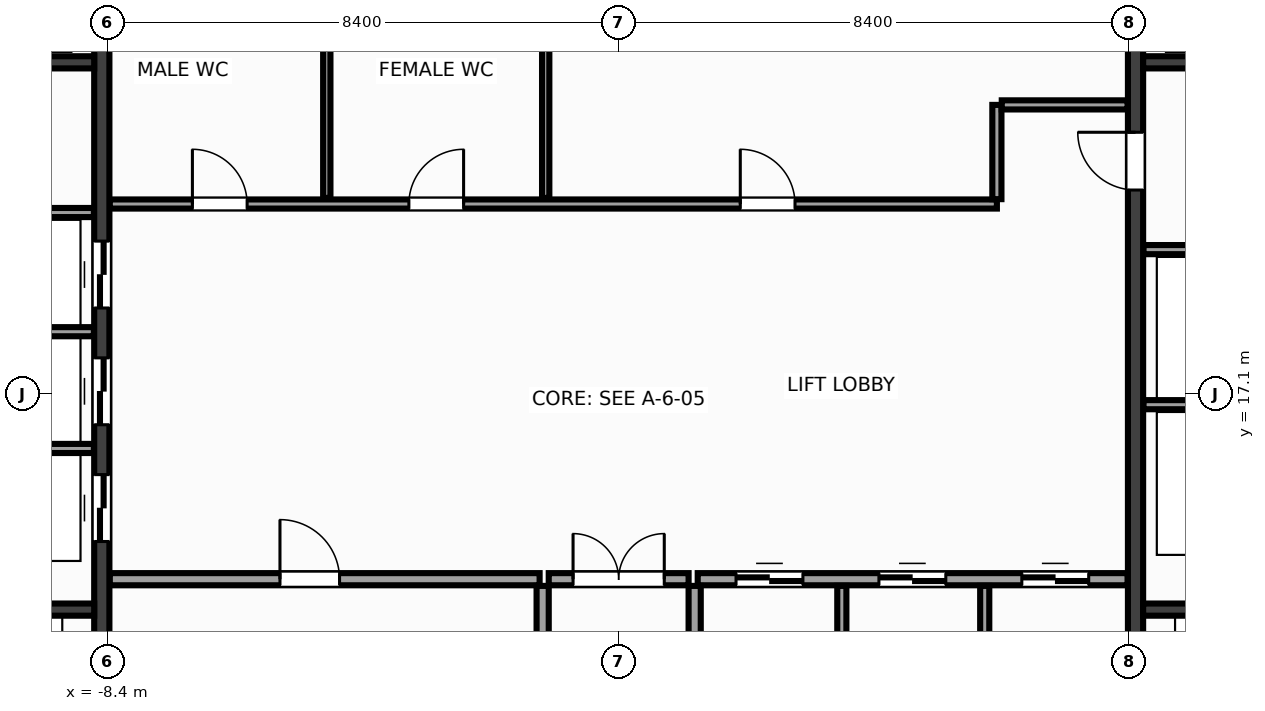
"""IFC4 building model, lengths in metres.
Left out: names, types, materials, properties, quantities, classifications, styles, units other than length and angle.
Written with IfcOpenShell. Run it as: python <this file> out.ifc"""

import sys

from ifc_helpers import new_model, si_unit, direction, frame, frame_2d, origin, place, context, subcontext, project, spatial, rectangle, extrude, source, transform, mapped, element, fill, save


model = new_model("IFC4")
c1 = context("Model", 3, precision=1e-05, world=origin(), true_north=direction((0.0, 1.0)))
c2 = subcontext(c1, "Body", "Model", "MODEL_VIEW")
j1 = project(units=[si_unit("LENGTHUNIT", "METRE"), si_unit("PLANEANGLEUNIT", "RADIAN")], contexts=[c1])
p1 = place(None, origin())
s1 = spatial("IfcSite", under=j1, at=p1, CompositionType="ELEMENT")
p2 = place(p1, origin())
s2 = spatial("IfcBuilding", under=s1, at=p2, CompositionType="ELEMENT")
p3 = place(p2, frame((0.0, 0.0, 149.6)))
s3 = spatial("IfcBuildingStorey", under=s2, at=p3, CompositionType="ELEMENT", Elevation=149.6)
m1 = source(origin(), c2, "Body", "SweptSolid", [
    extrude(rectangle(XDim=12.95, YDim=0.25, at=frame_2d((6.475, 0.0))), origin(), (0.0, 0.0, 1.0), 3.6),
])
p4 = place(p3, frame((-8.5, 10.525, 0.0), z_axis=(0.0, 0.0, 1.0), x_axis=(0.0, 1.0, 0.0)))
e1 = element("IfcWall", 1, at=p4, inside=s3, PredefinedType="SHEAR", context=c2, shape_type="MappedRepresentation", body=[
    mapped(m1, transform((0.0, 0.0, 0.0), x_axis=(1.0, 0.0, 0.0), y_axis=(0.0, 1.0, 0.0), z_axis=(0.0, 0.0, 1.0), scale=1.0)),
])
p5 = place(p4, frame((4.145, 0.0, 0.0)))
e2 = element("IfcOpeningElement", 2, at=p5, cuts=e1, PredefinedType="OPENING", context=c2, shape_type="SweptSolid", body=[
    extrude(rectangle(XDim=1.1, YDim=2.15, at=frame_2d((0.55, 1.075))), frame((0.0, 0.137, 0.0), z_axis=(0.0, -1.0, 0.0), x_axis=(1.0, 0.0, 0.0)), (0.0, 0.0, 1.0), 0.274),
])
p6 = place(p4, frame((6.065, 0.0, 0.0)))
e3 = element("IfcOpeningElement", 3, at=p6, cuts=e1, PredefinedType="OPENING", context=c2, shape_type="SweptSolid", body=[
    extrude(rectangle(XDim=1.1, YDim=2.15, at=frame_2d((0.55, 1.075))), frame((0.0, 0.137, 0.0), z_axis=(0.0, -1.0, 0.0), x_axis=(1.0, 0.0, 0.0)), (0.0, 0.0, 1.0), 0.274),
])
p7 = place(p4, frame((7.985, 0.0, 0.0)))
e4 = element("IfcOpeningElement", 4, at=p7, cuts=e1, PredefinedType="OPENING", context=c2, shape_type="SweptSolid", body=[
    extrude(rectangle(XDim=1.1, YDim=2.15, at=frame_2d((0.55, 1.075))), frame((0.0, 0.137, 0.0), z_axis=(0.0, -1.0, 0.0), x_axis=(1.0, 0.0, 0.0)), (0.0, 0.0, 1.0), 0.274),
])
p8 = place(p3, frame((8.5, 10.525, 0.0), z_axis=(0.0, 0.0, 1.0), x_axis=(0.0, 1.0, 0.0)))
e5 = element("IfcWall", 5, at=p8, inside=s3, PredefinedType="SHEAR", context=c2, shape_type="MappedRepresentation", body=[
    mapped(m1, transform((0.0, 0.0, 0.0), x_axis=(1.0, 0.0, 0.0), y_axis=(0.0, 1.0, 0.0), z_axis=(0.0, 0.0, 1.0), scale=1.0)),
])
p9 = place(p8, frame((9.925, 0.0, 0.0)))
e6 = element("IfcOpeningElement", 6, at=p9, cuts=e5, PredefinedType="OPENING", context=c2, shape_type="SweptSolid", body=[
    extrude(rectangle(XDim=0.95, YDim=2.15, at=frame_2d((0.475, 1.075))), frame((0.0, 0.137, 0.0), z_axis=(0.0, -1.0, 0.0), x_axis=(1.0, 0.0, 0.0)), (0.0, 0.0, 1.0), 0.274),
])
m2 = source(origin(), c2, "Body", "SweptSolid", [
    extrude(rectangle(XDim=2.825, YDim=0.2, at=frame_2d((1.413, 0.0))), origin(), (0.0, 0.0, 1.0), 3.6),
])
for number, where, z_axis, x_axis in (
    (7, (-11.45, 13.55, 0.0), (0.0, 0.0, 1.0), (1.0, 0.0, 0.0)),
    (8, (8.625, 13.55, 0.0), (0.0, 0.0, 1.0), (1.0, 0.0, 0.0)),
):
    element("IfcWall", number, at=place(p3, frame(where, z_axis=z_axis, x_axis=x_axis)), inside=s3, PredefinedType="SHEAR", context=c2, shape_type="MappedRepresentation", body=[
        mapped(m2, transform((0.0, 0.0, 0.0), x_axis=(1.0, 0.0, 0.0), y_axis=(0.0, 1.0, 0.0), z_axis=(0.0, 0.0, 1.0), scale=1.0)),
    ])
m3 = source(origin(), c2, "Body", "SweptSolid", [
    extrude(rectangle(XDim=3.02, YDim=0.2, at=frame_2d((1.51, 0.0))), origin(), (0.0, 0.0, 1.0), 3.6),
])
for number, where, z_axis, x_axis in (
    (9, (-11.645, 22.55, 0.0), (0.0, 0.0, 1.0), (1.0, 0.0, 0.0)),
    (10, (8.625, 22.55, 0.0), (0.0, 0.0, 1.0), (1.0, 0.0, 0.0)),
):
    element("IfcWall", number, at=place(p3, frame(where, z_axis=z_axis, x_axis=x_axis)), inside=s3, PredefinedType="SHEAR", context=c2, shape_type="MappedRepresentation", body=[
        mapped(m3, transform((0.0, 0.0, 0.0), x_axis=(1.0, 0.0, 0.0), y_axis=(0.0, 1.0, 0.0), z_axis=(0.0, 0.0, 1.0), scale=1.0)),
    ])
m4 = source(origin(), c2, "Body", "SweptSolid", [
    extrude(rectangle(XDim=3.01, YDim=0.15, at=frame_2d((1.505, 0.0))), origin(), (0.0, 0.0, 1.0), 3.38),
])
for number, where, z_axis, x_axis in (
    (11, (-11.64, 16.2, 0.0), (0.0, 0.0, 1.0), (1.0, 0.0, 0.0)),
    (12, (-11.64, 18.12, 0.0), (0.0, 0.0, 1.0), (1.0, 0.0, 0.0)),
    (13, (-11.64, 20.08, 0.0), (0.0, 0.0, 1.0), (1.0, 0.0, 0.0)),
    (14, (8.63, 16.92, 0.0), (0.0, 0.0, 1.0), (1.0, 0.0, 0.0)),
    (15, (8.63, 19.47, 0.0), (0.0, 0.0, 1.0), (1.0, 0.0, 0.0)),
):
    element("IfcWall", number, at=place(p3, frame(where, z_axis=z_axis, x_axis=x_axis)), inside=s3, PredefinedType="PARTITIONING", context=c2, shape_type="MappedRepresentation", body=[
        mapped(m4, transform((0.0, 0.0, 0.0), x_axis=(1.0, 0.0, 0.0), y_axis=(0.0, 1.0, 0.0), z_axis=(0.0, 0.0, 1.0), scale=1.0)),
    ])
m5 = source(origin(), c2, "Body", "SweptSolid", [
    extrude(rectangle(XDim=7.07, YDim=0.2, at=frame_2d((3.535, 0.0))), origin(), (0.0, 0.0, 1.0), 3.38),
])
p10 = place(p3, frame((-8.37, 14.05, 0.0), z_axis=(0.0, 0.0, 1.0), x_axis=(1.0, 0.0, 0.0)))
e16 = element("IfcWall", 16, at=p10, inside=s3, PredefinedType="PARTITIONING", context=c2, shape_type="MappedRepresentation", body=[
    mapped(m5, transform((0.0, 0.0, 0.0), x_axis=(1.0, 0.0, 0.0), y_axis=(0.0, 1.0, 0.0), z_axis=(0.0, 0.0, 1.0), scale=1.0)),
])
p11 = place(p10, frame((2.8, 0.0, 0.0)))
e17 = element("IfcOpeningElement", 17, at=p11, cuts=e16, PredefinedType="OPENING", context=c2, shape_type="SweptSolid", body=[
    extrude(rectangle(XDim=0.98, YDim=2.15, at=frame_2d((0.49, 1.075))), frame((0.0, 0.112, 0.0), z_axis=(0.0, -1.0, 0.0), x_axis=(1.0, 0.0, 0.0)), (0.0, 0.0, 1.0), 0.224),
])
p12 = place(p3, frame((1.3, 14.05, 0.0), z_axis=(0.0, 0.0, 1.0), x_axis=(1.0, 0.0, 0.0)))
e18 = element("IfcWall", 18, at=p12, inside=s3, PredefinedType="PARTITIONING", context=c2, shape_type="MappedRepresentation", body=[
    mapped(m5, transform((0.0, 0.0, 0.0), x_axis=(1.0, 0.0, 0.0), y_axis=(0.0, 1.0, 0.0), z_axis=(0.0, 0.0, 1.0), scale=1.0)),
])
p13 = place(p12, frame((0.63, 0.0, 0.0)))
e19 = element("IfcOpeningElement", 19, at=p13, cuts=e18, PredefinedType="OPENING", context=c2, shape_type="SweptSolid", body=[
    extrude(rectangle(XDim=1.1, YDim=2.15, at=frame_2d((0.55, 1.075))), frame((0.0, 0.112, 0.0), z_axis=(0.0, -1.0, 0.0), x_axis=(1.0, 0.0, 0.0)), (0.0, 0.0, 1.0), 0.224),
])
p14 = place(p12, frame((2.98, 0.0, 0.0)))
e20 = element("IfcOpeningElement", 20, at=p14, cuts=e18, PredefinedType="OPENING", context=c2, shape_type="SweptSolid", body=[
    extrude(rectangle(XDim=1.1, YDim=2.15, at=frame_2d((0.55, 1.075))), frame((0.0, 0.112, 0.0), z_axis=(0.0, -1.0, 0.0), x_axis=(1.0, 0.0, 0.0)), (0.0, 0.0, 1.0), 0.224),
])
p15 = place(p12, frame((5.33, 0.0, 0.0)))
e21 = element("IfcOpeningElement", 21, at=p15, cuts=e18, PredefinedType="OPENING", context=c2, shape_type="SweptSolid", body=[
    extrude(rectangle(XDim=1.1, YDim=2.15, at=frame_2d((0.55, 1.075))), frame((0.0, 0.112, 0.0), z_axis=(0.0, -1.0, 0.0), x_axis=(1.0, 0.0, 0.0)), (0.0, 0.0, 1.0), 0.224),
])
m6 = source(origin(), c2, "Body", "SweptSolid", [
    extrude(rectangle(XDim=3.415, YDim=0.2, at=frame_2d((1.708, 0.0))), origin(), (0.0, 0.0, 1.0), 3.38),
])
for number, where, z_axis, x_axis in (
    (22, (-1.25, 10.525, 0.0), (0.0, 0.0, 1.0), (0.0, 1.0, 0.0)),
    (23, (1.25, 10.525, 0.0), (0.0, 0.0, 1.0), (0.0, 1.0, 0.0)),
):
    element("IfcWall", number, at=place(p3, frame(where, z_axis=z_axis, x_axis=x_axis)), inside=s3, PredefinedType="PARTITIONING", context=c2, shape_type="MappedRepresentation", body=[
        mapped(m6, transform((0.0, 0.0, 0.0), x_axis=(1.0, 0.0, 0.0), y_axis=(0.0, 1.0, 0.0), z_axis=(0.0, 0.0, 1.0), scale=1.0)),
    ])
m7 = source(origin(), c2, "Body", "SweptSolid", [
    extrude(rectangle(XDim=2.3, YDim=0.2, at=frame_2d((1.15, 0.0))), origin(), (0.0, 0.0, 1.0), 3.38),
])
p16 = place(p3, frame((-1.15, 14.05, 0.0), z_axis=(0.0, 0.0, 1.0), x_axis=(1.0, 0.0, 0.0)))
e24 = element("IfcWall", 24, at=p16, inside=s3, PredefinedType="PARTITIONING", context=c2, shape_type="MappedRepresentation", body=[
    mapped(m7, transform((0.0, 0.0, 0.0), x_axis=(1.0, 0.0, 0.0), y_axis=(0.0, 1.0, 0.0), z_axis=(0.0, 0.0, 1.0), scale=1.0)),
])
p17 = place(p16, frame((0.4, 0.0, 0.0)))
e25 = element("IfcOpeningElement", 25, at=p17, cuts=e24, PredefinedType="OPENING", context=c2, shape_type="SweptSolid", body=[
    extrude(rectangle(XDim=1.5, YDim=2.2, at=frame_2d((0.75, 1.1))), frame((0.0, 0.112, 0.0), z_axis=(0.0, -1.0, 0.0), x_axis=(1.0, 0.0, 0.0)), (0.0, 0.0, 1.0), 0.224),
])
m8 = source(origin(), c2, "Body", "SweptSolid", [
    extrude(rectangle(XDim=14.59, YDim=0.15, at=frame_2d((7.295, 0.0))), origin(), (0.0, 0.0, 1.0), 3.38),
])
p18 = place(p3, frame((-8.37, 20.22, 0.0), z_axis=(0.0, 0.0, 1.0), x_axis=(1.0, 0.0, 0.0)))
e26 = element("IfcWall", 26, at=p18, inside=s3, PredefinedType="PARTITIONING", context=c2, shape_type="MappedRepresentation", body=[
    mapped(m8, transform((0.0, 0.0, 0.0), x_axis=(1.0, 0.0, 0.0), y_axis=(0.0, 1.0, 0.0), z_axis=(0.0, 0.0, 1.0), scale=1.0)),
])
p19 = place(p18, frame((1.36, 0.0, 0.0)))
e27 = element("IfcOpeningElement", 27, at=p19, cuts=e26, PredefinedType="OPENING", context=c2, shape_type="SweptSolid", body=[
    extrude(rectangle(XDim=0.9, YDim=2.15, at=frame_2d((0.45, 1.075))), frame((0.0, 0.087, 0.0), z_axis=(0.0, -1.0, 0.0), x_axis=(1.0, 0.0, 0.0)), (0.0, 0.0, 1.0), 0.174),
])
p20 = place(p18, frame((4.92, 0.0, 0.0)))
e28 = element("IfcOpeningElement", 28, at=p20, cuts=e26, PredefinedType="OPENING", context=c2, shape_type="SweptSolid", body=[
    extrude(rectangle(XDim=0.9, YDim=2.15, at=frame_2d((0.45, 1.075))), frame((0.0, 0.087, 0.0), z_axis=(0.0, -1.0, 0.0), x_axis=(1.0, 0.0, 0.0)), (0.0, 0.0, 1.0), 0.174),
])
p21 = place(p18, frame((10.37, 0.0, 0.0)))
e29 = element("IfcOpeningElement", 29, at=p21, cuts=e26, PredefinedType="OPENING", context=c2, shape_type="SweptSolid", body=[
    extrude(rectangle(XDim=0.9, YDim=2.15, at=frame_2d((0.45, 1.075))), frame((0.0, 0.087, 0.0), z_axis=(0.0, -1.0, 0.0), x_axis=(1.0, 0.0, 0.0)), (0.0, 0.0, 1.0), 0.174),
])
m9 = source(origin(), c2, "Body", "SweptSolid", [
    extrude(rectangle(XDim=1.55, YDim=0.15, at=frame_2d((0.775, 0.0))), origin(), (0.0, 0.0, 1.0), 3.38),
])
p22 = place(p3, frame((6.22, 20.3, 0.0), z_axis=(0.0, 0.0, 1.0), x_axis=(0.0, 1.0, 0.0)))
e30 = element("IfcWall", 30, at=p22, inside=s3, PredefinedType="PARTITIONING", context=c2, shape_type="MappedRepresentation", body=[
    mapped(m9, transform((0.0, 0.0, 0.0), x_axis=(1.0, 0.0, 0.0), y_axis=(0.0, 1.0, 0.0), z_axis=(0.0, 0.0, 1.0), scale=1.0)),
])
m10 = source(origin(), c2, "Body", "SweptSolid", [
    extrude(rectangle(XDim=2.07, YDim=0.15, at=frame_2d((1.035, 0.0))), origin(), (0.0, 0.0, 1.0), 3.38),
])
p23 = place(p3, frame((6.3, 21.85, 0.0), z_axis=(0.0, 0.0, 1.0), x_axis=(1.0, 0.0, 0.0)))
e31 = element("IfcWall", 31, at=p23, inside=s3, PredefinedType="PARTITIONING", context=c2, shape_type="MappedRepresentation", body=[
    mapped(m10, transform((0.0, 0.0, 0.0), x_axis=(1.0, 0.0, 0.0), y_axis=(0.0, 1.0, 0.0), z_axis=(0.0, 0.0, 1.0), scale=1.0)),
])
m11 = source(origin(), c2, "Body", "SweptSolid", [
    extrude(rectangle(XDim=3.415, YDim=0.15, at=frame_2d((1.708, 0.0))), origin(), (0.0, 0.0, 1.0), 3.38),
])
for number, where, z_axis, x_axis in (
    (32, (3.67, 10.525, 0.0), (0.0, 0.0, 1.0), (0.0, 1.0, 0.0)),
    (33, (6.02, 10.525, 0.0), (0.0, 0.0, 1.0), (0.0, 1.0, 0.0)),
):
    element("IfcWall", number, at=place(p3, frame(where, z_axis=z_axis, x_axis=x_axis)), inside=s3, PredefinedType="PARTITIONING", context=c2, shape_type="MappedRepresentation", body=[
        mapped(m11, transform((0.0, 0.0, 0.0), x_axis=(1.0, 0.0, 0.0), y_axis=(0.0, 1.0, 0.0), z_axis=(0.0, 0.0, 1.0), scale=1.0)),
    ])
m12 = source(origin(), c2, "Body", "SweptSolid", [
    extrude(rectangle(XDim=3.115, YDim=0.12, at=frame_2d((1.558, 0.0))), origin(), (0.0, 0.0, 1.0), 3.38),
])
for number, where, z_axis, x_axis in (
    (34, (-4.8, 20.32, 0.0), (0.0, 0.0, 1.0), (0.0, 1.0, 0.0)),
    (35, (-1.2, 20.32, 0.0), (0.0, 0.0, 1.0), (0.0, 1.0, 0.0)),
):
    element("IfcWall", number, at=place(p3, frame(where, z_axis=z_axis, x_axis=x_axis)), inside=s3, PredefinedType="PARTITIONING", context=c2, shape_type="MappedRepresentation", body=[
        mapped(m12, transform((0.0, 0.0, 0.0), x_axis=(1.0, 0.0, 0.0), y_axis=(0.0, 1.0, 0.0), z_axis=(0.0, 0.0, 1.0), scale=1.0)),
    ])
m13 = source(origin(), c2, "Body", "SweptSolid", [
    extrude(rectangle(XDim=1.1, YDim=2.15, at=frame_2d((0.55, 1.075))), frame((0.0, 0.025, 0.0), z_axis=(0.0, -1.0, 0.0), x_axis=(1.0, 0.0, 0.0)), (0.0, 0.0, 1.0), 0.05),
])
p24 = place(p5, origin())
e36 = element("IfcDoor", 36, at=p24, inside=s3, OperationType="DOUBLE_DOOR_SLIDING", PredefinedType="DOOR", context=c2, shape_type="MappedRepresentation", body=[
    mapped(m13, transform((0.0, 0.0, 0.0), x_axis=(1.0, 0.0, 0.0), y_axis=(0.0, 1.0, 0.0), z_axis=(0.0, 0.0, 1.0), scale=1.0)),
])
fill(e2, e36)
p25 = place(p6, origin())
e37 = element("IfcDoor", 37, at=p25, inside=s3, OperationType="DOUBLE_DOOR_SLIDING", PredefinedType="DOOR", context=c2, shape_type="MappedRepresentation", body=[
    mapped(m13, transform((0.0, 0.0, 0.0), x_axis=(1.0, 0.0, 0.0), y_axis=(0.0, 1.0, 0.0), z_axis=(0.0, 0.0, 1.0), scale=1.0)),
])
fill(e3, e37)
p26 = place(p7, origin())
e38 = element("IfcDoor", 38, at=p26, inside=s3, OperationType="DOUBLE_DOOR_SLIDING", PredefinedType="DOOR", context=c2, shape_type="MappedRepresentation", body=[
    mapped(m13, transform((0.0, 0.0, 0.0), x_axis=(1.0, 0.0, 0.0), y_axis=(0.0, 1.0, 0.0), z_axis=(0.0, 0.0, 1.0), scale=1.0)),
])
fill(e4, e38)
m14 = source(origin(), c2, "Body", "SweptSolid", [
    extrude(rectangle(XDim=0.95, YDim=2.15, at=frame_2d((0.475, 1.075))), frame((0.0, 0.025, 0.0), z_axis=(0.0, -1.0, 0.0), x_axis=(1.0, 0.0, 0.0)), (0.0, 0.0, 1.0), 0.05),
])
p27 = place(p9, origin())
e39 = element("IfcDoor", 39, at=p27, inside=s3, OperationType="SINGLE_SWING_RIGHT", PredefinedType="DOOR", context=c2, shape_type="MappedRepresentation", body=[
    mapped(m14, transform((0.0, 0.0, 0.0), x_axis=(1.0, 0.0, 0.0), y_axis=(0.0, 1.0, 0.0), z_axis=(0.0, 0.0, 1.0), scale=1.0)),
])
fill(e6, e39)
m15 = source(origin(), c2, "Body", "SweptSolid", [
    extrude(rectangle(XDim=0.98, YDim=2.15, at=frame_2d((0.49, 1.075))), frame((0.0, 0.025, 0.0), z_axis=(0.0, -1.0, 0.0), x_axis=(1.0, 0.0, 0.0)), (0.0, 0.0, 1.0), 0.05),
])
p28 = place(p11, origin())
e40 = element("IfcDoor", 40, at=p28, inside=s3, OperationType="SINGLE_SWING_LEFT", PredefinedType="DOOR", context=c2, shape_type="MappedRepresentation", body=[
    mapped(m15, transform((0.0, 0.0, 0.0), x_axis=(1.0, 0.0, 0.0), y_axis=(0.0, 1.0, 0.0), z_axis=(0.0, 0.0, 1.0), scale=1.0)),
])
fill(e17, e40)
p29 = place(p13, origin())
e41 = element("IfcDoor", 41, at=p29, inside=s3, OperationType="DOUBLE_DOOR_SLIDING", PredefinedType="DOOR", context=c2, shape_type="MappedRepresentation", body=[
    mapped(m13, transform((0.0, 0.0, 0.0), x_axis=(1.0, 0.0, 0.0), y_axis=(0.0, 1.0, 0.0), z_axis=(0.0, 0.0, 1.0), scale=1.0)),
])
fill(e19, e41)
p30 = place(p14, origin())
e42 = element("IfcDoor", 42, at=p30, inside=s3, OperationType="DOUBLE_DOOR_SLIDING", PredefinedType="DOOR", context=c2, shape_type="MappedRepresentation", body=[
    mapped(m13, transform((0.0, 0.0, 0.0), x_axis=(1.0, 0.0, 0.0), y_axis=(0.0, 1.0, 0.0), z_axis=(0.0, 0.0, 1.0), scale=1.0)),
])
fill(e20, e42)
p31 = place(p15, origin())
e43 = element("IfcDoor", 43, at=p31, inside=s3, OperationType="DOUBLE_DOOR_SLIDING", PredefinedType="DOOR", context=c2, shape_type="MappedRepresentation", body=[
    mapped(m13, transform((0.0, 0.0, 0.0), x_axis=(1.0, 0.0, 0.0), y_axis=(0.0, 1.0, 0.0), z_axis=(0.0, 0.0, 1.0), scale=1.0)),
])
fill(e21, e43)
m16 = source(origin(), c2, "Body", "SweptSolid", [
    extrude(rectangle(XDim=1.5, YDim=2.2, at=frame_2d((0.75, 1.1))), frame((0.0, 0.025, 0.0), z_axis=(0.0, -1.0, 0.0), x_axis=(1.0, 0.0, 0.0)), (0.0, 0.0, 1.0), 0.05),
])
p32 = place(p17, origin())
e44 = element("IfcDoor", 44, at=p32, inside=s3, OperationType="DOUBLE_DOOR_SINGLE_SWING", PredefinedType="DOOR", context=c2, shape_type="MappedRepresentation", body=[
    mapped(m16, transform((0.0, 0.0, 0.0), x_axis=(1.0, 0.0, 0.0), y_axis=(0.0, 1.0, 0.0), z_axis=(0.0, 0.0, 1.0), scale=1.0)),
])
fill(e25, e44)
m17 = source(origin(), c2, "Body", "SweptSolid", [
    extrude(rectangle(XDim=0.9, YDim=2.15, at=frame_2d((0.45, 1.075))), frame((0.0, 0.025, 0.0), z_axis=(0.0, -1.0, 0.0), x_axis=(1.0, 0.0, 0.0)), (0.0, 0.0, 1.0), 0.05),
])
p33 = place(p19, origin())
e45 = element("IfcDoor", 45, at=p33, inside=s3, OperationType="SINGLE_SWING_LEFT", PredefinedType="DOOR", context=c2, shape_type="MappedRepresentation", body=[
    mapped(m17, transform((0.0, 0.0, 0.0), x_axis=(1.0, 0.0, 0.0), y_axis=(0.0, 1.0, 0.0), z_axis=(0.0, 0.0, 1.0), scale=1.0)),
])
fill(e27, e45)
p34 = place(p20, origin())
e46 = element("IfcDoor", 46, at=p34, inside=s3, OperationType="SINGLE_SWING_RIGHT", PredefinedType="DOOR", context=c2, shape_type="MappedRepresentation", body=[
    mapped(m17, transform((0.0, 0.0, 0.0), x_axis=(1.0, 0.0, 0.0), y_axis=(0.0, 1.0, 0.0), z_axis=(0.0, 0.0, 1.0), scale=1.0)),
])
fill(e28, e46)
p35 = place(p21, origin())
e47 = element("IfcDoor", 47, at=p35, inside=s3, OperationType="SINGLE_SWING_LEFT", PredefinedType="DOOR", context=c2, shape_type="MappedRepresentation", body=[
    mapped(m17, transform((0.0, 0.0, 0.0), x_axis=(1.0, 0.0, 0.0), y_axis=(0.0, 1.0, 0.0), z_axis=(0.0, 0.0, 1.0), scale=1.0)),
])
fill(e29, e47)
save(model, sys.argv[1])
